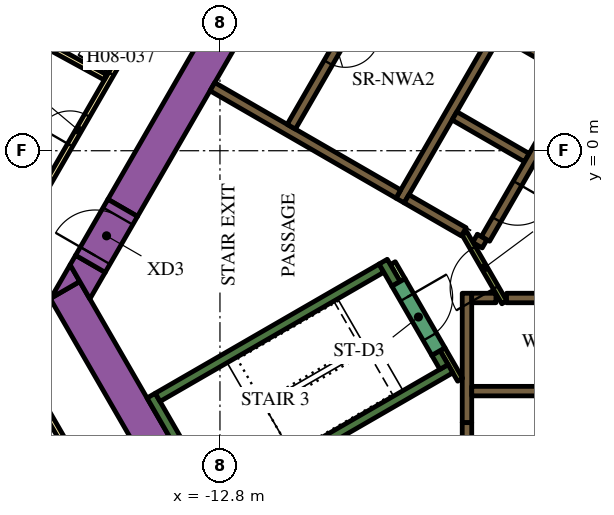
"""IFC4 building model, lengths in metres.
Left out: names, types, materials, properties, quantities, classifications, styles, units other than length and angle.
Written with IfcOpenShell. Run it as: python <this file> out.ifc"""

import sys

from ifc_helpers import new_model, si_unit, direction, frame, frame_2d, origin, place, context, subcontext, project, spatial, polyline, rectangle, outline, extrude, element, fill, save


model = new_model("IFC4")
c1 = context("Model", 3, precision=1e-05, world=origin(), true_north=direction((0.0, 1.0)))
c2 = subcontext(c1, "Body", "Model", "MODEL_VIEW")
j1 = project(units=[si_unit("LENGTHUNIT", "METRE"), si_unit("PLANEANGLEUNIT", "RADIAN")], contexts=[c1])
p1 = place(None, origin())
s1 = spatial("IfcSite", under=j1, at=p1, CompositionType="ELEMENT")
p2 = place(p1, origin())
s2 = spatial("IfcBuilding", under=s1, at=p2, CompositionType="ELEMENT")
p3 = place(p2, frame((0.0, 0.0, 114.9)))
s3 = spatial("IfcBuildingStorey", under=s2, at=p3, CompositionType="ELEMENT", Elevation=114.9)
p4 = place(p3, frame((-15.36, -1.503, 0.0), z_axis=(0.0, 0.0, 1.0), x_axis=(0.50000389221, 0.866023156604, 0.0)))
e1 = element("IfcWall", 1, at=p4, inside=s3, PredefinedType="SOLIDWALL", context=c2, shape_type="SweptSolid", body=[
    extrude(rectangle(XDim=21.0, YDim=0.9, at=frame_2d((10.5, 0.0))), origin(), (0.0, 0.0, 1.0), 3.9),
])
p5 = place(p3, frame((-12.134, -11.883, 0.0), z_axis=(0.0, 0.0, 1.0), x_axis=(-0.500005339912, 0.866022320763, 0.0)))
e2 = element("IfcWall", 2, at=p5, inside=s3, PredefinedType="SOLIDWALL", context=c2, shape_type="SweptSolid", body=[
    extrude(rectangle(XDim=9.488, YDim=0.9, at=frame_2d((4.744, 0.0))), origin(), (0.0, 0.0, 1.0), 3.9),
])
p6 = place(p3, origin())
e3 = element("IfcWall", 3, at=p6, inside=s3, PredefinedType="SOLIDWALL", context=c2, shape_type="SweptSolid", body=[
    extrude(outline(polyline([(-16.489, -3.44), (-17.251, -3.88), (-16.743, -3.0), (-16.489, -3.44)])), origin(), (0.0, 0.0, 1.0), 3.9),
])
e4 = element("IfcWall", 4, at=p6, inside=s3, PredefinedType="SOLIDWALL", context=c2, shape_type="SweptSolid", body=[
    extrude(outline(polyline([(-15.82, -3.201), (-16.223, -3.9), (-16.743, -3.0), (-16.599, -2.751), (-15.82, -3.201)])), origin(), (0.0, 0.0, 1.0), 3.9),
])
p7 = place(p3, frame((-12.885, -9.431, 0.0), z_axis=(0.0, 0.0, 1.0), x_axis=(-0.500020560727, 0.866013532718, 0.0)))
e5 = element("IfcWall", 5, at=p7, inside=s3, PredefinedType="SOLIDWALL", context=c2, shape_type="SweptSolid", body=[
    extrude(rectangle(XDim=3.45, YDim=0.25, at=frame_2d((1.725, 0.0))), origin(), (0.0, 0.0, 1.0), 3.9),
])
p8 = place(p3, frame((-14.44, -6.49, 0.0), z_axis=(0.0, 0.0, 1.0), x_axis=(0.866022966069, 0.500004222222, 0.0)))
e6 = element("IfcWall", 6, at=p8, inside=s3, PredefinedType="SOLIDWALL", context=c2, shape_type="SweptSolid", body=[
    extrude(rectangle(XDim=6.8, YDim=0.25, at=frame_2d((3.4, 0.0))), origin(), (0.0, 0.0, 1.0), 3.9),
])
p9 = place(p3, frame((-8.168, -3.503, 0.0), z_axis=(0.0, 0.0, 1.0), x_axis=(-0.499952099219, 0.866053057547, 0.0)))
e7 = element("IfcWall", 7, at=p9, inside=s3, PredefinedType="SOLIDWALL", context=c2, shape_type="SweptSolid", body=[
    extrude(rectangle(XDim=0.675, YDim=0.25, at=frame_2d((0.337, 0.0))), origin(), (0.0, 0.0, 1.0), 3.9),
])
p10 = place(p3, frame((-12.84, -9.261, 0.0), z_axis=(0.0, 0.0, 1.0), x_axis=(0.866016039709, 0.500016218704, 0.0)))
e8 = element("IfcWall", 8, at=p10, inside=s3, PredefinedType="SOLIDWALL", context=c2, shape_type="SweptSolid", body=[
    extrude(rectangle(XDim=7.05, YDim=0.25, at=frame_2d((3.525, 0.0))), origin(), (0.0, 0.0, 1.0), 3.9),
])
p11 = place(p3, frame((-6.905, -5.69, 0.0), z_axis=(0.0, 0.0, 1.0), x_axis=(-0.500402024738, 0.865793170242, 0.0)))
e9 = element("IfcWall", 9, at=p11, inside=s3, PredefinedType="SOLIDWALL", context=c2, shape_type="SweptSolid", body=[
    extrude(rectangle(XDim=0.425, YDim=0.25, at=frame_2d((0.212, 0.0))), origin(), (0.0, 0.0, 1.0), 3.9),
])
p12 = place(p3, frame((-5.259, -3.875, 0.0), z_axis=(0.0, 0.0, 1.0), x_axis=(1.0, 0.0, 0.0)))
e10 = element("IfcWall", 10, at=p12, inside=s3, PredefinedType="SOLIDWALL", context=c2, shape_type="SweptSolid", body=[
    extrude(rectangle(XDim=10.489, YDim=0.25, at=frame_2d((5.244, 0.0))), origin(), (0.0, 0.0, 1.0), 3.9),
])
p13 = place(p3, frame((-6.3, -3.75, 0.0), z_axis=(0.0, 0.0, 1.0), x_axis=(0.0, -1.0, 0.0)))
e11 = element("IfcWall", 11, at=p13, inside=s3, PredefinedType="SOLIDWALL", context=c2, shape_type="SweptSolid", body=[
    extrude(rectangle(XDim=3.404, YDim=0.25, at=frame_2d((1.702, 0.0))), origin(), (0.0, 0.0, 1.0), 3.9),
])
p14 = place(p3, frame((-6.175, -3.875, 0.0), z_axis=(0.0, 0.0, 1.0), x_axis=(1.0, 0.0, 0.0)))
e12 = element("IfcWall", 12, at=p14, inside=s3, PredefinedType="SOLIDWALL", context=c2, shape_type="SweptSolid", body=[
    extrude(rectangle(XDim=0.637, YDim=0.25, at=frame_2d((0.318, 0.0))), origin(), (0.0, 0.0, 1.0), 3.9),
])
p15 = place(p3, frame((-8.06, -1.311, 0.0), z_axis=(0.0, 0.0, 1.0), x_axis=(0.50000273126, 0.866023826885, 0.0)))
e13 = element("IfcWall", 13, at=p15, inside=s3, PredefinedType="SOLIDWALL", context=c2, shape_type="SweptSolid", body=[
    extrude(rectangle(XDim=10.33, YDim=0.25, at=frame_2d((5.165, 0.0))), origin(), (0.0, 0.0, 1.0), 3.9),
])
for number, where, z_axis, x_axis in (
    (14, (-5.369, 3.1, 0.0), (0.0, 0.0, 1.0), (0.866, -0.5, 0.0)),
    (15, (-4.724, -0.182, 0.0), (0.0, 0.0, 1.0), (-0.866, 0.5, 0.0)),
):
    element("IfcWall", number, at=place(p3, frame(where, z_axis=z_axis, x_axis=x_axis)), inside=s3, PredefinedType="SOLIDWALL", context=c2, shape_type="SweptSolid", body=[
        extrude(rectangle(XDim=2.2, YDim=0.25, at=frame_2d((1.1, 0.0))), origin(), (0.0, 0.0, 1.0), 3.9),
    ])
p16 = place(p3, frame((-6.088, -2.305, 0.0), z_axis=(0.0, 0.0, 1.0), x_axis=(0.866059450854, -0.499941024108, 0.0)))
e16 = element("IfcWall", 16, at=p16, inside=s3, PredefinedType="SOLIDWALL", context=c2, shape_type="SweptSolid", body=[
    extrude(rectangle(XDim=0.29, YDim=0.25, at=frame_2d((0.145, 0.0))), origin(), (0.0, 0.0, 1.0), 3.9),
])
p17 = place(p3, frame((-7.889, -1.265, 0.0), z_axis=(0.0, 0.0, 1.0), x_axis=(0.865986741702, -0.500066958712, 0.0)))
e17 = element("IfcWall", 17, at=p17, inside=s3, PredefinedType="SOLIDWALL", context=c2, shape_type="SweptSolid", body=[
    extrude(rectangle(XDim=1.738, YDim=0.25, at=frame_2d((0.869, 0.0))), origin(), (0.0, 0.0, 1.0), 3.9),
])
p18 = place(p3, frame((-8.106, -1.14, 0.0), z_axis=(0.0, 0.0, 1.0), x_axis=(-0.866000643155, 0.500042884217, 0.0)))
e18 = element("IfcWall", 18, at=p18, inside=s3, PredefinedType="SOLIDWALL", context=c2, shape_type="SweptSolid", body=[
    extrude(rectangle(XDim=5.65, YDim=0.25, at=frame_2d((2.825, 0.0))), origin(), (0.0, 0.0, 1.0), 3.9),
])
p19 = place(p3, frame((-6.48, -6.027, 0.0), z_axis=(0.0, 0.0, 1.0), x_axis=(-0.499927229454, 0.866067413802, 0.0)))
e19 = element("IfcWall", 19, at=p19, inside=s3, PredefinedType="PARTITIONING", context=c2, shape_type="SweptSolid", body=[
    extrude(rectangle(XDim=0.929, YDim=0.15, at=frame_2d((0.464, 0.0))), origin(), (0.0, 0.0, 1.0), 3.9),
])
p20 = place(p3, frame((-8.252, -2.958, 0.0), z_axis=(0.0, 0.0, 1.0), x_axis=(0.500174715838, -0.865924508047, 0.0)))
e20 = element("IfcWall", 20, at=p20, inside=s3, PredefinedType="PARTITIONING", context=c2, shape_type="SweptSolid", body=[
    extrude(rectangle(XDim=0.514, YDim=0.15, at=frame_2d((0.257, 0.0))), origin(), (0.0, 0.0, 1.0), 2.75),
])
p21 = place(p3, frame((-6.175, -6.325, 0.0), z_axis=(0.0, 0.0, 1.0), x_axis=(1.0, 0.0, 0.0)))
e21 = element("IfcWall", 21, at=p21, inside=s3, PredefinedType="SOLIDWALL", context=c2, shape_type="SweptSolid", body=[
    extrude(rectangle(XDim=12.35, YDim=0.25, at=frame_2d((6.175, 0.0))), origin(), (0.0, 0.0, 1.0), 3.9),
])
p22 = place(p21, frame((3.205, 0.0, 0.0)))
e22 = element("IfcOpeningElement", 22, at=p22, cuts=e21, PredefinedType="OPENING", context=c2, shape_type="SweptSolid", body=[
    extrude(rectangle(XDim=0.9, YDim=2.1, at=frame_2d((0.45, 1.05))), frame((0.0, 0.135, 0.0), z_axis=(0.0, -1.0, 0.0), x_axis=(1.0, 0.0, 0.0)), (0.0, 0.0, 1.0), 0.27),
])
p23 = place(p21, frame((8.145, 0.0, 0.0)))
e23 = element("IfcOpeningElement", 23, at=p23, cuts=e21, PredefinedType="OPENING", context=c2, shape_type="SweptSolid", body=[
    extrude(rectangle(XDim=1.1, YDim=2.1, at=frame_2d((0.55, 1.05))), frame((0.0, 0.135, 0.0), z_axis=(0.0, -1.0, 0.0), x_axis=(1.0, 0.0, 0.0)), (0.0, 0.0, 1.0), 0.27),
])
p24 = place(p21, frame((10.665, 0.0, 0.0)))
e24 = element("IfcOpeningElement", 24, at=p24, cuts=e21, PredefinedType="OPENING", context=c2, shape_type="SweptSolid", body=[
    extrude(rectangle(XDim=1.1, YDim=2.1, at=frame_2d((0.55, 1.05))), frame((0.0, 0.135, 0.0), z_axis=(0.0, -1.0, 0.0), x_axis=(1.0, 0.0, 0.0)), (0.0, 0.0, 1.0), 0.27),
])
p25 = place(p3, frame((-6.008, 9.144, 0.0), z_axis=(0.0, 0.0, 1.0), x_axis=(-0.500006956611, -0.866021387346, 0.0)))
e25 = element("IfcWall", 25, at=p25, inside=s3, PredefinedType="SOLIDWALL", context=c2, shape_type="SweptSolid", body=[
    extrude(rectangle(XDim=9.83, YDim=0.25, at=frame_2d((4.915, 0.0))), origin(), (0.0, 0.0, 1.0), 3.9),
])
p26 = place(p25, frame((6.985, 0.0, 0.0)))
e26 = element("IfcOpeningElement", 26, at=p26, cuts=e25, PredefinedType="OPENING", context=c2, shape_type="SweptSolid", body=[
    extrude(rectangle(XDim=0.9, YDim=2.1, at=frame_2d((0.45, 1.05))), frame((0.0, 0.135, 0.0), z_axis=(0.0, -1.0, 0.0), x_axis=(1.0, 0.0, 0.0)), (0.0, 0.0, 1.0), 0.27),
])
p27 = place(p3, frame((-0.898, 6.194, 0.0), z_axis=(0.0, 0.0, 1.0), x_axis=(-0.499996202215, -0.866027596426, 0.0)))
e27 = element("IfcWall", 27, at=p27, inside=s3, PredefinedType="SOLIDWALL", context=c2, shape_type="SweptSolid", body=[
    extrude(rectangle(XDim=9.83, YDim=0.25, at=frame_2d((4.915, 0.0))), origin(), (0.0, 0.0, 1.0), 3.9),
])
p28 = place(p27, frame((0.585, 0.0, 0.0)))
e28 = element("IfcOpeningElement", 28, at=p28, cuts=e27, PredefinedType="OPENING", context=c2, shape_type="SweptSolid", body=[
    extrude(rectangle(XDim=1.1, YDim=2.1, at=frame_2d((0.55, 1.05))), frame((0.0, 0.135, 0.0), z_axis=(0.0, -1.0, 0.0), x_axis=(1.0, 0.0, 0.0)), (0.0, 0.0, 1.0), 0.27),
])
p29 = place(p27, frame((3.105, 0.0, 0.0)))
e29 = element("IfcOpeningElement", 29, at=p29, cuts=e27, PredefinedType="OPENING", context=c2, shape_type="SweptSolid", body=[
    extrude(rectangle(XDim=1.1, YDim=2.1, at=frame_2d((0.55, 1.05))), frame((0.0, 0.135, 0.0), z_axis=(0.0, -1.0, 0.0), x_axis=(1.0, 0.0, 0.0)), (0.0, 0.0, 1.0), 0.27),
])
p30 = place(p27, frame((5.625, 0.0, 0.0)))
e30 = element("IfcOpeningElement", 30, at=p30, cuts=e27, PredefinedType="OPENING", context=c2, shape_type="SweptSolid", body=[
    extrude(rectangle(XDim=1.1, YDim=2.1, at=frame_2d((0.55, 1.05))), frame((0.0, 0.135, 0.0), z_axis=(0.0, -1.0, 0.0), x_axis=(1.0, 0.0, 0.0)), (0.0, 0.0, 1.0), 0.27),
])
p31 = place(p27, frame((8.145, 0.0, 0.0)))
e31 = element("IfcOpeningElement", 31, at=p31, cuts=e27, PredefinedType="OPENING", context=c2, shape_type="SweptSolid", body=[
    extrude(rectangle(XDim=1.1, YDim=2.1, at=frame_2d((0.55, 1.05))), frame((0.0, 0.135, 0.0), z_axis=(0.0, -1.0, 0.0), x_axis=(1.0, 0.0, 0.0)), (0.0, 0.0, 1.0), 0.27),
])
p32 = place(p3, frame((-8.103, -3.466, 0.0), z_axis=(0.0, 0.0, 1.0), x_axis=(0.500078061341, -0.865980330357, 0.0)))
e32 = element("IfcWall", 32, at=p32, inside=s3, PredefinedType="SOLIDWALL", context=c2, shape_type="SweptSolid", body=[
    extrude(rectangle(XDim=2.1, YDim=0.4, at=frame_2d((1.05, 0.0))), origin(), (0.0, 0.0, 1.0), 3.9),
])
p33 = place(p32, frame((0.45, 0.0, 0.0)))
e33 = element("IfcOpeningElement", 33, at=p33, cuts=e32, PredefinedType="OPENING", context=c2, shape_type="SweptSolid", body=[
    extrude(rectangle(XDim=1.2, YDim=2.1, at=frame_2d((0.6, 1.05))), frame((0.0, 0.21, 0.0), z_axis=(0.0, -1.0, 0.0), x_axis=(1.0, 0.0, 0.0)), (0.0, 0.0, 1.0), 0.42),
])
p34 = place(p3, frame((-6.3, -7.154, 0.0), z_axis=(0.0, 0.0, 1.0), x_axis=(0.0, -1.0, 0.0)))
e34 = element("IfcWall", 34, at=p34, inside=s3, PredefinedType="SOLIDWALL", context=c2, shape_type="SweptSolid", body=[
    extrude(rectangle(XDim=1.8, YDim=0.25, at=frame_2d((0.9, 0.0))), origin(), (0.0, 0.0, 1.0), 3.9),
])
p35 = place(p34, frame((0.45, 0.0, 0.0)))
e35 = element("IfcOpeningElement", 35, at=p35, cuts=e34, PredefinedType="OPENING", context=c2, shape_type="SweptSolid", body=[
    extrude(rectangle(XDim=0.9, YDim=2.1, at=frame_2d((0.45, 1.05))), frame((0.0, 0.135, 0.0), z_axis=(0.0, -1.0, 0.0), x_axis=(1.0, 0.0, 0.0)), (0.0, 0.0, 1.0), 0.27),
])
p36 = place(p3, frame((-5.317, -3.99, 0.0), z_axis=(0.0, 0.0, 1.0), x_axis=(-0.500027713859, 0.866009402589, 0.0)))
e36 = element("IfcWall", 36, at=p36, inside=s3, PredefinedType="PARTITIONING", context=c2, shape_type="SweptSolid", body=[
    extrude(rectangle(XDim=2.1, YDim=0.15, at=frame_2d((1.05, 0.0))), origin(), (0.0, 0.0, 1.0), 3.9),
])
p37 = place(p36, frame((0.45, 0.0, 0.0)))
e37 = element("IfcOpeningElement", 37, at=p37, cuts=e36, PredefinedType="OPENING", context=c2, shape_type="SweptSolid", body=[
    extrude(rectangle(XDim=1.2, YDim=2.1, at=frame_2d((0.6, 1.05))), frame((0.0, 0.085, 0.0), z_axis=(0.0, -1.0, 0.0), x_axis=(1.0, 0.0, 0.0)), (0.0, 0.0, 1.0), 0.17),
])
p38 = place(p3, frame((-16.209, -2.976, 0.0), z_axis=(0.0, 0.0, 1.0), x_axis=(0.499954529098, 0.86605165483, 0.0)))
e38 = element("IfcWall", 38, at=p38, inside=s3, PredefinedType="SOLIDWALL", context=c2, shape_type="SweptSolid", body=[
    extrude(rectangle(XDim=1.7, YDim=0.9, at=frame_2d((0.85, 0.0))), origin(), (0.0, 0.0, 1.0), 3.9),
])
p39 = place(p38, frame((0.25, 0.0, 0.0)))
e39 = element("IfcOpeningElement", 39, at=p39, cuts=e38, PredefinedType="OPENING", context=c2, shape_type="SweptSolid", body=[
    extrude(rectangle(XDim=1.2, YDim=2.1, at=frame_2d((0.6, 1.05))), frame((0.0, 0.46, 0.0), z_axis=(0.0, -1.0, 0.0), x_axis=(1.0, 0.0, 0.0)), (0.0, 0.0, 1.0), 0.92),
])
p40 = place(p3, frame((-19.081, -3.9, 0.0), z_axis=(0.0, 0.0, 1.0), x_axis=(0.499998313975, 0.866026377209, 0.0)))
e40 = element("IfcWall", 40, at=p40, inside=s3, PredefinedType="PARTITIONING", context=c2, shape_type="SweptSolid", body=[
    extrude(rectangle(XDim=25.766, YDim=0.15, at=frame_2d((12.883, 0.0))), origin(), (0.0, 0.0, 1.0), 2.75),
])
p41 = place(p40, frame((19.306, 0.0, 0.0)))
e41 = element("IfcOpeningElement", 41, at=p41, cuts=e40, PredefinedType="OPENING", context=c2, shape_type="SweptSolid", body=[
    extrude(rectangle(XDim=1.0, YDim=2.1, at=frame_2d((0.5, 1.05))), frame((0.0, 0.085, 0.0), z_axis=(0.0, -1.0, 0.0), x_axis=(1.0, 0.0, 0.0)), (0.0, 0.0, 1.0), 0.17),
])
p42 = place(p40, frame((18.0, 0.0, 0.0)))
e42 = element("IfcOpeningElement", 42, at=p42, cuts=e40, PredefinedType="OPENING", context=c2, shape_type="SweptSolid", body=[
    extrude(rectangle(XDim=1.0, YDim=2.1, at=frame_2d((0.5, 1.05))), frame((0.0, 0.085, 0.0), z_axis=(0.0, -1.0, 0.0), x_axis=(1.0, 0.0, 0.0)), (0.0, 0.0, 1.0), 0.17),
])
p43 = place(p40, frame((6.838, 0.0, 0.0)))
e43 = element("IfcOpeningElement", 43, at=p43, cuts=e40, PredefinedType="OPENING", context=c2, shape_type="SweptSolid", body=[
    extrude(rectangle(XDim=1.0, YDim=2.1, at=frame_2d((0.5, 1.05))), frame((0.0, 0.085, 0.0), z_axis=(0.0, -1.0, 0.0), x_axis=(1.0, 0.0, 0.0)), (0.0, 0.0, 1.0), 0.17),
])
p44 = place(p40, frame((4.674, 0.0, 0.0)))
e44 = element("IfcOpeningElement", 44, at=p44, cuts=e40, PredefinedType="OPENING", context=c2, shape_type="SweptSolid", body=[
    extrude(rectangle(XDim=0.9, YDim=2.1, at=frame_2d((0.45, 1.05))), frame((0.0, 0.085, 0.0), z_axis=(0.0, -1.0, 0.0), x_axis=(1.0, 0.0, 0.0)), (0.0, 0.0, 1.0), 0.17),
])
p45 = place(p40, frame((0.18, 0.0, 0.0)))
e45 = element("IfcOpeningElement", 45, at=p45, cuts=e40, PredefinedType="OPENING", context=c2, shape_type="SweptSolid", body=[
    extrude(rectangle(XDim=1.0, YDim=2.1, at=frame_2d((0.5, 1.05))), frame((0.0, 0.085, 0.0), z_axis=(0.0, -1.0, 0.0), x_axis=(1.0, 0.0, 0.0)), (0.0, 0.0, 1.0), 0.17),
])
p46 = place(p3, frame((-16.412, -8.523, 0.0), z_axis=(0.0, 0.0, 1.0), x_axis=(-0.500001929737, 0.866024289647, 0.0)))
e46 = element("IfcWall", 46, at=p46, inside=s3, PredefinedType="PARTITIONING", context=c2, shape_type="SweptSolid", body=[
    extrude(rectangle(XDim=5.268, YDim=0.15, at=frame_2d((2.634, 0.0))), origin(), (0.0, 0.0, 1.0), 2.75),
])
p47 = place(p3, frame((-26.591, -3.122, 0.0), z_axis=(0.0, 0.0, 1.0), x_axis=(0.893766213273, -0.448533115847, 0.0)))
e47 = element("IfcWall", 47, at=p47, inside=s3, PredefinedType="PARTITIONING", context=c2, shape_type="SweptSolid", body=[
    extrude(rectangle(XDim=10.875, YDim=0.15, at=frame_2d((5.438, 0.0))), origin(), (0.0, 0.0, 1.0), 2.75),
])
p48 = place(p3, frame((-21.614, 5.102, 0.0), z_axis=(0.0, 0.0, 1.0), x_axis=(0.877484555087, -0.479604895287, 0.0)))
e48 = element("IfcWall", 48, at=p48, inside=s3, PredefinedType="PARTITIONING", context=c2, shape_type="SweptSolid", body=[
    extrude(rectangle(XDim=6.611, YDim=0.15, at=frame_2d((3.306, 0.0))), origin(), (0.0, 0.0, 1.0), 2.75),
])
p49 = place(p26, origin())
e49 = element("IfcDoor", 49, at=p49, inside=s3, OperationType="SINGLE_SWING_LEFT", PredefinedType="DOOR", context=c2, shape_type="SweptSolid", body=[
    extrude(rectangle(XDim=0.9, YDim=2.1, at=frame_2d((0.45, 1.05))), frame((0.0, 0.025, 0.0), z_axis=(0.0, -1.0, 0.0), x_axis=(1.0, 0.0, 0.0)), (0.0, 0.0, 1.0), 0.05),
])
fill(e26, e49)
p50 = place(p31, origin())
e50 = element("IfcDoor", 50, at=p50, inside=s3, OperationType="DOUBLE_DOOR_SLIDING", PredefinedType="DOOR", context=c2, shape_type="SweptSolid", body=[
    extrude(rectangle(XDim=1.1, YDim=2.1, at=frame_2d((0.55, 1.05))), frame((0.0, 0.025, 0.0), z_axis=(0.0, -1.0, 0.0), x_axis=(1.0, 0.0, 0.0)), (0.0, 0.0, 1.0), 0.05),
])
fill(e31, e50)
p51 = place(p33, origin())
e51 = element("IfcDoor", 51, at=p51, inside=s3, OperationType="SINGLE_SWING_LEFT", PredefinedType="DOOR", context=c2, shape_type="SweptSolid", body=[
    extrude(rectangle(XDim=1.2, YDim=2.1, at=frame_2d((0.6, 1.05))), frame((0.0, 0.025, 0.0), z_axis=(0.0, -1.0, 0.0), x_axis=(1.0, 0.0, 0.0)), (0.0, 0.0, 1.0), 0.05),
])
fill(e33, e51)
p52 = place(p37, origin())
e52 = element("IfcDoor", 52, at=p52, inside=s3, OperationType="SINGLE_SWING_LEFT", PredefinedType="DOOR", context=c2, shape_type="SweptSolid", body=[
    extrude(rectangle(XDim=1.2, YDim=2.1, at=frame_2d((0.6, 1.05))), frame((0.0, 0.025, 0.0), z_axis=(0.0, -1.0, 0.0), x_axis=(1.0, 0.0, 0.0)), (0.0, 0.0, 1.0), 0.05),
])
fill(e37, e52)
p53 = place(p39, origin())
e53 = element("IfcDoor", 53, at=p53, inside=s3, OperationType="SINGLE_SWING_LEFT", PredefinedType="DOOR", context=c2, shape_type="SweptSolid", body=[
    extrude(rectangle(XDim=1.2, YDim=2.1, at=frame_2d((0.6, 1.05))), frame((0.0, 0.025, 0.0), z_axis=(0.0, -1.0, 0.0), x_axis=(1.0, 0.0, 0.0)), (0.0, 0.0, 1.0), 0.05),
])
fill(e39, e53)
p54 = place(p43, origin())
e54 = element("IfcDoor", 54, at=p54, inside=s3, OperationType="SINGLE_SWING_LEFT", PredefinedType="DOOR", context=c2, shape_type="SweptSolid", body=[
    extrude(rectangle(XDim=1.0, YDim=2.1, at=frame_2d((0.5, 1.05))), frame((0.0, 0.025, 0.0), z_axis=(0.0, -1.0, 0.0), x_axis=(1.0, 0.0, 0.0)), (0.0, 0.0, 1.0), 0.05),
])
fill(e43, e54)
p55 = place(p44, origin())
e55 = element("IfcDoor", 55, at=p55, inside=s3, OperationType="SINGLE_SWING_RIGHT", PredefinedType="DOOR", context=c2, shape_type="SweptSolid", body=[
    extrude(rectangle(XDim=0.9, YDim=2.1, at=frame_2d((0.45, 1.05))), frame((0.0, 0.025, 0.0), z_axis=(0.0, -1.0, 0.0), x_axis=(1.0, 0.0, 0.0)), (0.0, 0.0, 1.0), 0.05),
])
fill(e44, e55)
save(model, sys.argv[1])
